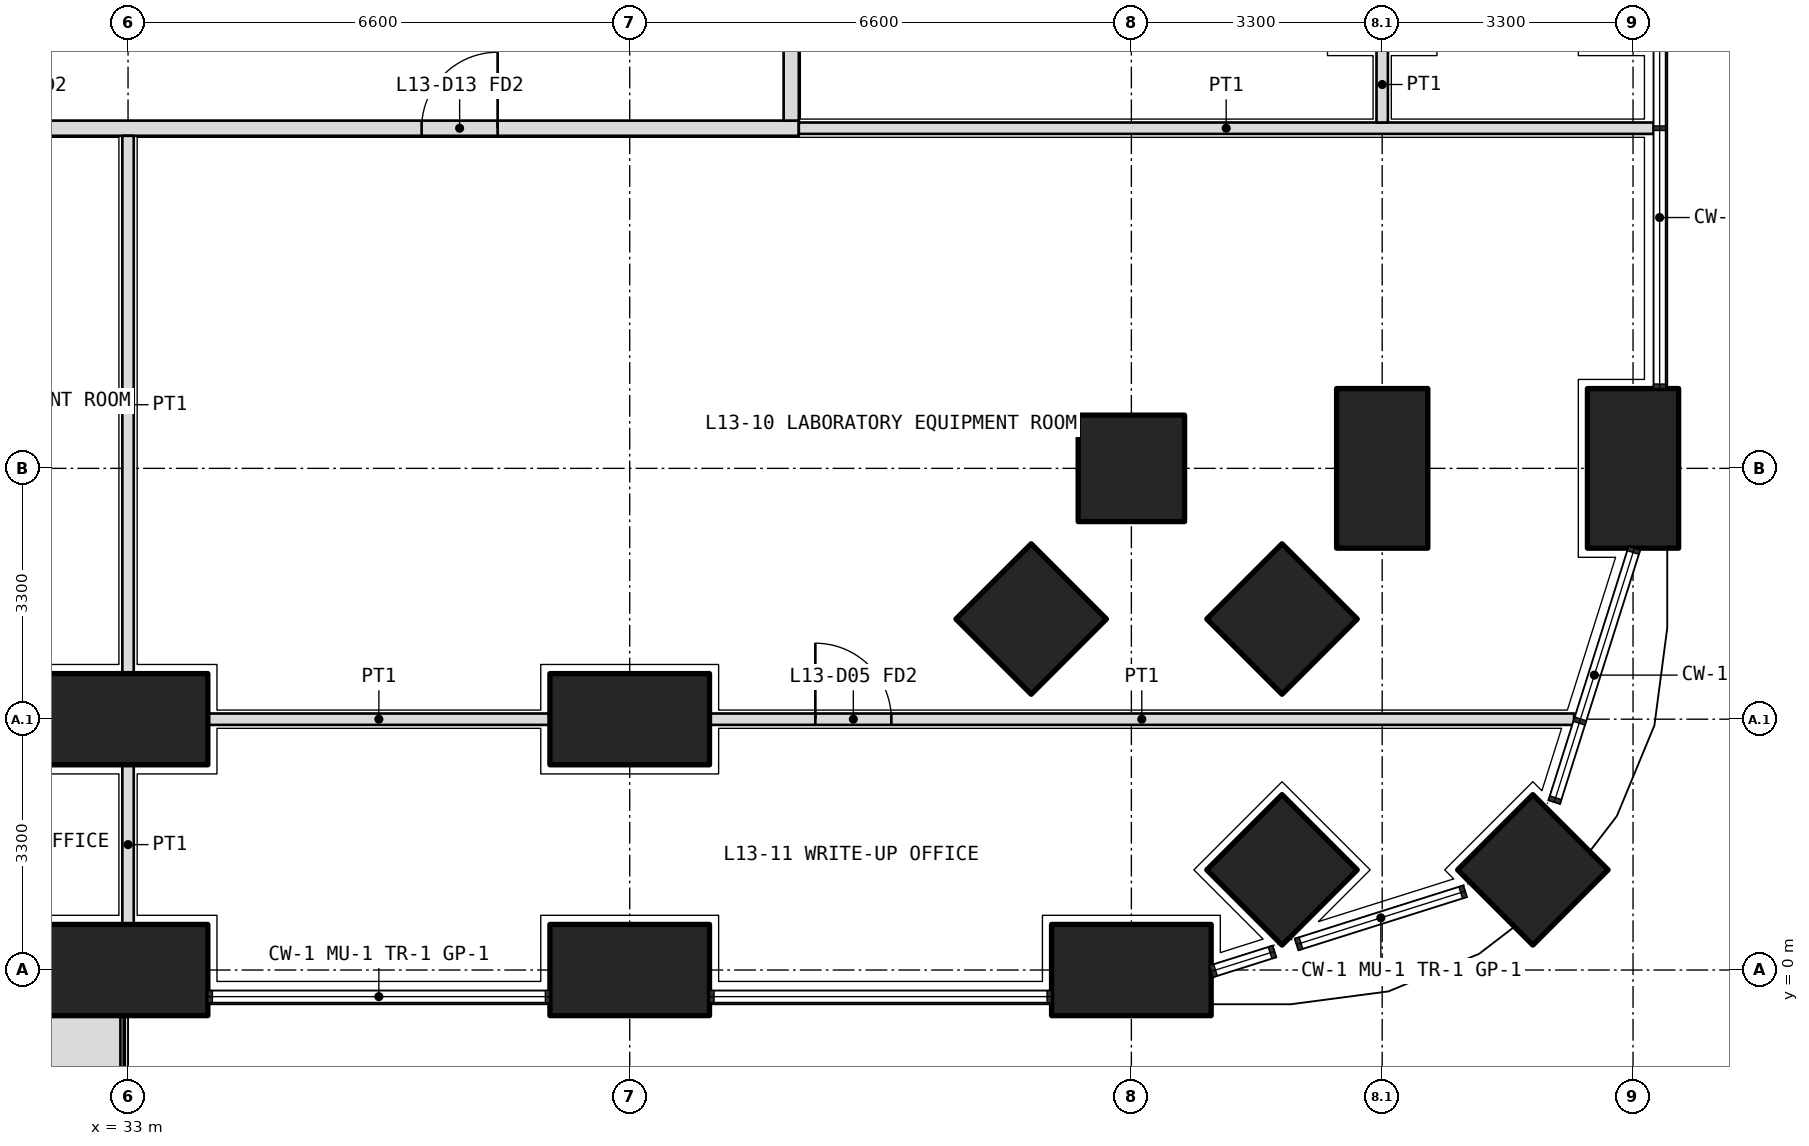
"""IFC4 building model, lengths in metres.
Left out: names, types, materials, properties, quantities, classifications, styles, units other than length and angle.
Written with IfcOpenShell. Run it as: python <this file> out.ifc"""

import sys

from ifc_helpers import new_model, si_unit, direction, frame, frame_2d, origin, origin_2d, place, context, subcontext, project, spatial, polyline, rectangle, outline, extrude, element, fill, save


model = new_model("IFC4")
c1 = context("Model", 3, precision=1e-05, world=origin(), true_north=direction((0.0, 1.0)))
c2 = subcontext(c1, "Body", "Model", "MODEL_VIEW")
j1 = project(units=[si_unit("LENGTHUNIT", "METRE"), si_unit("PLANEANGLEUNIT", "RADIAN")], contexts=[c1])
p1 = place(None, origin())
s1 = spatial("IfcSite", under=j1, at=p1, CompositionType="ELEMENT")
p2 = place(p1, origin())
s2 = spatial("IfcBuilding", under=s1, at=p2, CompositionType="ELEMENT")
p3 = place(p2, frame((0.0, 0.0, 59.1)))
s3 = spatial("IfcBuildingStorey", under=s2, at=p3, CompositionType="ELEMENT", Elevation=59.1)
p4 = place(p3, frame((51.482, 1.318, 0.0), z_axis=(0.0, 0.0, 1.0), x_axis=(0.707106781187, 0.707106781187, 0.0)))
e1 = element("IfcColumn", 1, at=p4, inside=s3, PredefinedType="COLUMN", context=c2, shape_type="SweptSolid", body=[
    extrude(rectangle(XDim=1.4, YDim=1.4, at=origin_2d()), origin(), (0.0, 0.0, 1.0), 4.2),
])
for number, where, z_axis, x_axis in (
    (2, (33.0, 0.0, 0.0), (0.0, 0.0, 1.0), (1.0, 0.0, 0.0)),
    (3, (39.6, 0.0, 0.0), (0.0, 0.0, 1.0), (1.0, 0.0, 0.0)),
    (4, (46.2, 0.0, 0.0), (0.0, 0.0, 1.0), (1.0, 0.0, 0.0)),
    (5, (52.8, 6.6, 0.0), (0.0, 0.0, 1.0), (0.0, 1.0, 0.0)),
):
    element("IfcColumn", number, at=place(p3, frame(where, z_axis=z_axis, x_axis=x_axis)), inside=s3, PredefinedType="COLUMN", context=c2, shape_type="SweptSolid", body=[
        extrude(rectangle(XDim=2.1, YDim=1.2, at=origin_2d()), origin(), (0.0, 0.0, 1.0), 4.2),
    ])
for number, where, z_axis, x_axis in (
    (6, (46.2, 6.6, 0.0), (0.0, 0.0, 1.0), (1.0, 0.0, 0.0)),
    (7, (48.182, 1.318, 0.0), (0.0, 0.0, 1.0), (0.707, 0.707, 0.0)),
):
    element("IfcColumn", number, at=place(p3, frame(where, z_axis=z_axis, x_axis=x_axis)), inside=s3, PredefinedType="COLUMN", context=c2, shape_type="SweptSolid", body=[
        extrude(rectangle(XDim=1.4, YDim=1.4, at=origin_2d()), origin(), (0.0, 0.0, 1.0), 4.2),
    ])
p5 = place(p3, frame((49.5, 6.6, 0.0), z_axis=(0.0, 0.0, 1.0), x_axis=(0.0, 1.0, 0.0)))
e8 = element("IfcColumn", 8, at=p5, inside=s3, PredefinedType="COLUMN", context=c2, shape_type="SweptSolid", body=[
    extrude(rectangle(XDim=2.1, YDim=1.2, at=origin_2d()), origin(), (0.0, 0.0, 1.0), 4.2),
])
p6 = place(p3, frame((48.182, 4.618, 0.0), z_axis=(0.0, 0.0, 1.0), x_axis=(0.707106781187, 0.707106781187, 0.0)))
e9 = element("IfcColumn", 9, at=p6, inside=s3, PredefinedType="COLUMN", context=c2, shape_type="SweptSolid", body=[
    extrude(rectangle(XDim=1.4, YDim=1.4, at=origin_2d()), origin(), (0.0, 0.0, 1.0), 4.2),
])
for number, where, z_axis, x_axis in (
    (10, (33.0, 3.3, 0.0), (0.0, 0.0, 1.0), (1.0, 0.0, 0.0)),
    (11, (39.6, 3.3, 0.0), (0.0, 0.0, 1.0), (1.0, 0.0, 0.0)),
):
    element("IfcColumn", number, at=place(p3, frame(where, z_axis=z_axis, x_axis=x_axis)), inside=s3, PredefinedType="COLUMN", context=c2, shape_type="SweptSolid", body=[
        extrude(rectangle(XDim=2.1, YDim=1.2, at=origin_2d()), origin(), (0.0, 0.0, 1.0), 4.2),
    ])
p7 = place(p3, frame((44.882, 4.618, 0.0), z_axis=(0.0, 0.0, 1.0), x_axis=(0.707106781187, 0.707106781187, 0.0)))
e12 = element("IfcColumn", 12, at=p7, inside=s3, PredefinedType="COLUMN", context=c2, shape_type="SweptSolid", body=[
    extrude(rectangle(XDim=1.4, YDim=1.4, at=origin_2d()), origin(), (0.0, 0.0, 1.0), 4.2),
])
p8 = place(p3, origin())
e13 = element("IfcWall", 13, at=p8, inside=s3, PredefinedType="USERDEFINED", context=c2, shape_type="SweptSolid", body=[
    extrude(outline(polyline([(23.85, -1.55), (32.9, -1.55), (32.9, -0.55), (23.85, -0.55), (23.85, -1.55)]), holes=[polyline([(24.0, -1.4), (32.75, -1.4), (32.75, -0.7), (24.0, -0.7), (24.0, -1.4)])]), origin(), (0.0, 0.0, 1.0), 1.05),
])
p9 = place(p3, frame((10.975, 11.075, 0.0), z_axis=(0.0, 0.0, 1.0), x_axis=(1.0, 0.0, 0.0)))
e14 = element("IfcWall", 14, at=p9, inside=s3, PredefinedType="PARTITIONING", context=c2, shape_type="SweptSolid", body=[
    extrude(rectangle(XDim=30.85, YDim=0.2, at=frame_2d((15.425, 0.0))), origin(), (0.0, 0.0, 1.0), 2.85),
])
p10 = place(p9, frame((0.663, 0.0, 0.0)))
e15 = element("IfcOpeningElement", 15, at=p10, cuts=e14, PredefinedType="OPENING", context=c2, shape_type="SweptSolid", body=[
    extrude(rectangle(XDim=1.0, YDim=2.1, at=frame_2d((0.5, 1.05))), frame((0.0, 0.11, 0.0), z_axis=(0.0, -1.0, 0.0), x_axis=(1.0, 0.0, 0.0)), (0.0, 0.0, 1.0), 0.22),
])
p11 = place(p9, frame((3.275, 0.0, 0.0)))
e16 = element("IfcOpeningElement", 16, at=p11, cuts=e14, PredefinedType="OPENING", context=c2, shape_type="SweptSolid", body=[
    extrude(rectangle(XDim=1.2, YDim=2.1, at=frame_2d((0.6, 1.05))), frame((0.0, 0.11, 0.0), z_axis=(0.0, -1.0, 0.0), x_axis=(1.0, 0.0, 0.0)), (0.0, 0.0, 1.0), 0.22),
])
p12 = place(p9, frame((6.775, 0.0, 0.0)))
e17 = element("IfcOpeningElement", 17, at=p12, cuts=e14, PredefinedType="OPENING", context=c2, shape_type="SweptSolid", body=[
    extrude(rectangle(XDim=1.0, YDim=2.1, at=frame_2d((0.5, 1.05))), frame((0.0, 0.11, 0.0), z_axis=(0.0, -1.0, 0.0), x_axis=(1.0, 0.0, 0.0)), (0.0, 0.0, 1.0), 0.22),
])
p13 = place(p9, frame((10.075, 0.0, 0.0)))
e18 = element("IfcOpeningElement", 18, at=p13, cuts=e14, PredefinedType="OPENING", context=c2, shape_type="SweptSolid", body=[
    extrude(rectangle(XDim=1.0, YDim=2.1, at=frame_2d((0.5, 1.05))), frame((0.0, 0.11, 0.0), z_axis=(0.0, -1.0, 0.0), x_axis=(1.0, 0.0, 0.0)), (0.0, 0.0, 1.0), 0.22),
])
p14 = place(p9, frame((14.825, 0.0, 0.0)))
e19 = element("IfcOpeningElement", 19, at=p14, cuts=e14, PredefinedType="OPENING", context=c2, shape_type="SweptSolid", body=[
    extrude(rectangle(XDim=1.2, YDim=2.1, at=frame_2d((0.6, 1.05))), frame((0.0, 0.11, 0.0), z_axis=(0.0, -1.0, 0.0), x_axis=(1.0, 0.0, 0.0)), (0.0, 0.0, 1.0), 0.22),
])
p15 = place(p9, frame((19.875, 0.0, 0.0)))
e20 = element("IfcOpeningElement", 20, at=p15, cuts=e14, PredefinedType="OPENING", context=c2, shape_type="SweptSolid", body=[
    extrude(rectangle(XDim=1.0, YDim=2.1, at=frame_2d((0.5, 1.05))), frame((0.0, 0.11, 0.0), z_axis=(0.0, -1.0, 0.0), x_axis=(1.0, 0.0, 0.0)), (0.0, 0.0, 1.0), 0.22),
])
p16 = place(p9, frame((25.887, 0.0, 0.0)))
e21 = element("IfcOpeningElement", 21, at=p16, cuts=e14, PredefinedType="OPENING", context=c2, shape_type="SweptSolid", body=[
    extrude(rectangle(XDim=1.0, YDim=2.1, at=frame_2d((0.5, 1.05))), frame((0.0, 0.11, 0.0), z_axis=(0.0, -1.0, 0.0), x_axis=(1.0, 0.0, 0.0)), (0.0, 0.0, 1.0), 0.22),
])
p17 = place(p3, frame((41.725, 11.175, 0.0), z_axis=(0.0, 0.0, 1.0), x_axis=(0.0, 1.0, 0.0)))
e22 = element("IfcWall", 22, at=p17, inside=s3, PredefinedType="PARTITIONING", context=c2, shape_type="SweptSolid", body=[
    extrude(rectangle(XDim=5.325, YDim=0.2, at=frame_2d((2.663, 0.0))), origin(), (0.0, 0.0, 1.0), 2.85),
])
p18 = place(p17, frame((2.113, 0.0, 0.0)))
e23 = element("IfcOpeningElement", 23, at=p18, cuts=e22, PredefinedType="OPENING", context=c2, shape_type="SweptSolid", body=[
    extrude(rectangle(XDim=1.0, YDim=2.1, at=frame_2d((0.5, 1.05))), frame((0.0, 0.11, 0.0), z_axis=(0.0, -1.0, 0.0), x_axis=(1.0, 0.0, 0.0)), (0.0, 0.0, 1.0), 0.22),
])
p19 = place(p3, frame((53.07, 11.075, 0.0), z_axis=(0.0, 0.0, 1.0), x_axis=(-1.0, 0.0, 0.0)))
e24 = element("IfcWall", 24, at=p19, inside=s3, PredefinedType="PARTITIONING", context=c2, shape_type="SweptSolid", body=[
    extrude(rectangle(XDim=11.245, YDim=0.15, at=frame_2d((5.623, 0.0))), origin(), (0.0, 0.0, 1.0), 2.7),
])
p20 = place(p3, frame((34.05, 3.3, 0.0), z_axis=(0.0, 0.0, 1.0), x_axis=(1.0, 0.0, 0.0)))
e25 = element("IfcWall", 25, at=p20, inside=s3, PredefinedType="PARTITIONING", context=c2, shape_type="SweptSolid", body=[
    extrude(rectangle(XDim=4.5, YDim=0.15, at=frame_2d((2.25, 0.0))), origin(), (0.0, 0.0, 1.0), 3.9),
])
p21 = place(p3, frame((40.65, 3.3, 0.0), z_axis=(0.0, 0.0, 1.0), x_axis=(1.0, 0.0, 0.0)))
e26 = element("IfcWall", 26, at=p21, inside=s3, PredefinedType="PARTITIONING", context=c2, shape_type="SweptSolid", body=[
    extrude(rectangle(XDim=11.374, YDim=0.15, at=frame_2d((5.687, 0.0))), origin(), (0.0, 0.0, 1.0), 2.7),
])
p22 = place(p21, frame((1.392, 0.0, 0.0)))
e27 = element("IfcOpeningElement", 27, at=p22, cuts=e26, PredefinedType="OPENING", context=c2, shape_type="SweptSolid", body=[
    extrude(rectangle(XDim=1.0, YDim=2.1, at=frame_2d((0.5, 1.05))), frame((0.0, 0.085, 0.0), z_axis=(0.0, -1.0, 0.0), x_axis=(1.0, 0.0, 0.0)), (0.0, 0.0, 1.0), 0.17),
])
p23 = place(p3, frame((33.0, 0.6, 0.0), z_axis=(0.0, 0.0, 1.0), x_axis=(0.0, 1.0, 0.0)))
e28 = element("IfcWall", 28, at=p23, inside=s3, PredefinedType="PARTITIONING", context=c2, shape_type="SweptSolid", body=[
    extrude(rectangle(XDim=2.1, YDim=0.15, at=frame_2d((1.05, 0.0))), origin(), (0.0, 0.0, 1.0), 2.85),
])
p24 = place(p3, frame((33.0, 3.9, 0.0), z_axis=(0.0, 0.0, 1.0), x_axis=(0.0, 1.0, 0.0)))
e29 = element("IfcWall", 29, at=p24, inside=s3, PredefinedType="PARTITIONING", context=c2, shape_type="SweptSolid", body=[
    extrude(rectangle(XDim=7.075, YDim=0.15, at=frame_2d((3.538, 0.0))), origin(), (0.0, 0.0, 1.0), 2.85),
])
p25 = place(p3, frame((49.5, 11.15, 0.0), z_axis=(0.0, 0.0, 1.0), x_axis=(0.0, 1.0, 0.0)))
e30 = element("IfcWall", 30, at=p25, inside=s3, PredefinedType="PARTITIONING", context=c2, shape_type="SweptSolid", body=[
    extrude(rectangle(XDim=1.0, YDim=0.15, at=frame_2d((0.5, 0.0))), origin(), (0.0, 0.0, 1.0), 3.9),
])
p26 = place(p16, origin())
e31 = element("IfcDoor", 31, at=p26, inside=s3, OperationType="SINGLE_SWING_RIGHT", PredefinedType="DOOR", context=c2, shape_type="SweptSolid", body=[
    extrude(rectangle(XDim=1.0, YDim=2.1, at=frame_2d((0.5, 1.05))), frame((0.0, 0.025, 0.0), z_axis=(0.0, -1.0, 0.0), x_axis=(1.0, 0.0, 0.0)), (0.0, 0.0, 1.0), 0.05),
])
fill(e21, e31)
p27 = place(p22, origin())
e32 = element("IfcDoor", 32, at=p27, inside=s3, OperationType="SINGLE_SWING_LEFT", PredefinedType="DOOR", context=c2, shape_type="SweptSolid", body=[
    extrude(rectangle(XDim=1.0, YDim=2.1, at=frame_2d((0.5, 1.05))), frame((0.0, 0.025, 0.0), z_axis=(0.0, -1.0, 0.0), x_axis=(1.0, 0.0, 0.0)), (0.0, 0.0, 1.0), 0.05),
])
fill(e27, e32)
save(model, sys.argv[1])
